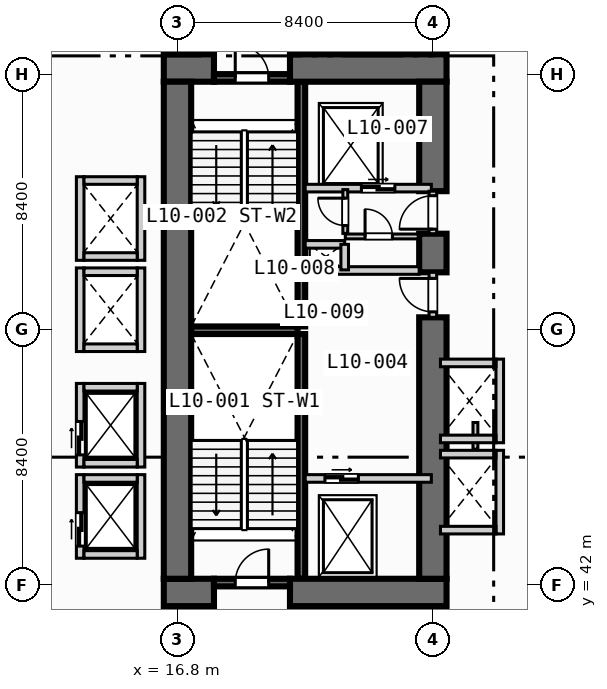
"""IFC4 building model, lengths in metres.
Left out: names, types, materials, properties, quantities, classifications, styles, units other than length and angle.
Written with IfcOpenShell. Run it as: python <this file> out.ifc"""

import sys

from ifc_helpers import new_model, si_unit, direction, frame, frame_2d, origin, place, context, subcontext, project, spatial, rectangle, extrude, element, fill, save


model = new_model("IFC4")
c1 = context("Model", 3, precision=1e-05, world=origin(), true_north=direction((0.0, 1.0)))
c2 = subcontext(c1, "Body", "Model", "MODEL_VIEW")
j1 = project(units=[si_unit("LENGTHUNIT", "METRE"), si_unit("PLANEANGLEUNIT", "RADIAN")], contexts=[c1])
p1 = place(None, origin())
s1 = spatial("IfcSite", under=j1, at=p1, CompositionType="ELEMENT")
p2 = place(p1, origin())
s2 = spatial("IfcBuilding", under=s1, at=p2, CompositionType="ELEMENT")
p3 = place(p2, frame((0.0, 0.0, 47.2)))
s3 = spatial("IfcBuildingStorey", under=s2, at=p3, CompositionType="ELEMENT", Elevation=47.2)
for number, where, z_axis, x_axis in (
    (1, (20.875, 42.2, 0.0), (0.0, 0.0, 1.0), (0.0, 1.0, 0.0)),
    (2, (20.875, 50.5, 0.0), (0.0, 0.0, 1.0), (0.0, 1.0, 0.0)),
):
    element("IfcWall", number, at=place(p3, frame(where, z_axis=z_axis, x_axis=x_axis)), inside=s3, PredefinedType="SOLIDWALL", context=c2, shape_type="SweptSolid", body=[
        extrude(rectangle(XDim=8.05, YDim=0.25, at=frame_2d((4.025, 0.0))), origin(), (0.0, 0.0, 1.0), 3.55),
    ])
p4 = place(p3, frame((17.25, 50.375, 0.0), z_axis=(0.0, 0.0, 1.0), x_axis=(1.0, 0.0, 0.0)))
e3 = element("IfcWall", 3, at=p4, inside=s3, PredefinedType="SOLIDWALL", context=c2, shape_type="SweptSolid", body=[
    extrude(rectangle(XDim=3.5, YDim=0.25, at=frame_2d((1.75, 0.0))), origin(), (0.0, 0.0, 1.0), 3.55),
])
p5 = place(p3, frame((16.35, 41.75, 0.0), z_axis=(0.0, 0.0, 1.0), x_axis=(1.0, 0.0, 0.0)))
e4 = element("IfcWall", 4, at=p5, inside=s3, PredefinedType="SHEAR", context=c2, shape_type="SweptSolid", body=[
    extrude(rectangle(XDim=1.65, YDim=0.9, at=frame_2d((0.825, 0.0))), origin(), (0.0, 0.0, 1.0), 3.55),
])
p6 = place(p3, frame((20.5, 41.75, 0.0), z_axis=(0.0, 0.0, 1.0), x_axis=(1.0, 0.0, 0.0)))
e5 = element("IfcWall", 5, at=p6, inside=s3, PredefinedType="SHEAR", context=c2, shape_type="SweptSolid", body=[
    extrude(rectangle(XDim=5.15, YDim=0.9, at=frame_2d((2.575, 0.0))), origin(), (0.0, 0.0, 1.0), 3.55),
])
p7 = place(p3, frame((16.35, 59.0, 0.0), z_axis=(0.0, 0.0, 1.0), x_axis=(1.0, 0.0, 0.0)))
e6 = element("IfcWall", 6, at=p7, inside=s3, PredefinedType="SHEAR", context=c2, shape_type="SweptSolid", body=[
    extrude(rectangle(XDim=1.65, YDim=0.9, at=frame_2d((0.825, 0.0))), origin(), (0.0, 0.0, 1.0), 3.55),
])
p8 = place(p3, frame((20.5, 59.0, 0.0), z_axis=(0.0, 0.0, 1.0), x_axis=(1.0, 0.0, 0.0)))
e7 = element("IfcWall", 7, at=p8, inside=s3, PredefinedType="SHEAR", context=c2, shape_type="SweptSolid", body=[
    extrude(rectangle(XDim=5.15, YDim=0.9, at=frame_2d((2.575, 0.0))), origin(), (0.0, 0.0, 1.0), 3.55),
])
p9 = place(p3, frame((16.8, 42.2, 0.0), z_axis=(0.0, 0.0, 1.0), x_axis=(0.0, 1.0, 0.0)))
e8 = element("IfcWall", 8, at=p9, inside=s3, PredefinedType="SHEAR", context=c2, shape_type="SweptSolid", body=[
    extrude(rectangle(XDim=16.35, YDim=0.9, at=frame_2d((8.175, 0.0))), origin(), (0.0, 0.0, 1.0), 3.55),
])
p10 = place(p3, frame((25.2, 42.2, 0.0), z_axis=(0.0, 0.0, 1.0), x_axis=(0.0, 1.0, 0.0)))
e9 = element("IfcWall", 9, at=p10, inside=s3, PredefinedType="SHEAR", context=c2, shape_type="SweptSolid", body=[
    extrude(rectangle(XDim=8.6, YDim=0.9, at=frame_2d((4.3, 0.0))), origin(), (0.0, 0.0, 1.0), 3.55),
])
p11 = place(p3, frame((25.2, 52.28, 0.0), z_axis=(0.0, 0.0, 1.0), x_axis=(0.0, 1.0, 0.0)))
e10 = element("IfcWall", 10, at=p11, inside=s3, PredefinedType="SHEAR", context=c2, shape_type="SweptSolid", body=[
    extrude(rectangle(XDim=1.27, YDim=0.9, at=frame_2d((0.635, 0.0))), origin(), (0.0, 0.0, 1.0), 3.55),
])
p12 = place(p3, frame((25.2, 54.95, 0.0), z_axis=(0.0, 0.0, 1.0), x_axis=(0.0, 1.0, 0.0)))
e11 = element("IfcWall", 11, at=p12, inside=s3, PredefinedType="SHEAR", context=c2, shape_type="SweptSolid", body=[
    extrude(rectangle(XDim=3.6, YDim=0.9, at=frame_2d((1.8, 0.0))), origin(), (0.0, 0.0, 1.0), 3.55),
])
p13 = place(p3, frame((18.0, 42.075, 0.0), z_axis=(0.0, 0.0, 1.0), x_axis=(1.0, 0.0, 0.0)))
e12 = element("IfcWall", 12, at=p13, inside=s3, PredefinedType="SOLIDWALL", context=c2, shape_type="SweptSolid", body=[
    extrude(rectangle(XDim=2.5, YDim=0.25, at=frame_2d((1.25, 0.0))), origin(), (0.0, 0.0, 1.0), 3.55),
])
p14 = place(p13, frame((0.7, 0.0, 0.0)))
e13 = element("IfcOpeningElement", 13, at=p14, cuts=e12, PredefinedType="OPENING", context=c2, shape_type="SweptSolid", body=[
    extrude(rectangle(XDim=1.1, YDim=2.15, at=frame_2d((0.55, 1.075))), frame((0.0, 0.135, 0.0), z_axis=(0.0, -1.0, 0.0), x_axis=(1.0, 0.0, 0.0)), (0.0, 0.0, 1.0), 0.27),
])
p15 = place(p3, frame((18.0, 58.675, 0.0), z_axis=(0.0, 0.0, 1.0), x_axis=(1.0, 0.0, 0.0)))
e14 = element("IfcWall", 14, at=p15, inside=s3, PredefinedType="SOLIDWALL", context=c2, shape_type="SweptSolid", body=[
    extrude(rectangle(XDim=2.5, YDim=0.25, at=frame_2d((1.25, 0.0))), origin(), (0.0, 0.0, 1.0), 3.55),
])
p16 = place(p15, frame((0.7, 0.0, 0.0)))
e15 = element("IfcOpeningElement", 15, at=p16, cuts=e14, PredefinedType="OPENING", context=c2, shape_type="SweptSolid", body=[
    extrude(rectangle(XDim=1.1, YDim=2.15, at=frame_2d((0.55, 1.075))), frame((0.0, 0.135, 0.0), z_axis=(0.0, -1.0, 0.0), x_axis=(1.0, 0.0, 0.0)), (0.0, 0.0, 1.0), 0.27),
])
p17 = place(p3, frame((21.0, 45.5, 0.0), z_axis=(0.0, 0.0, 1.0), x_axis=(1.0, 0.0, 0.0)))
e16 = element("IfcWall", 16, at=p17, inside=s3, PredefinedType="SOLIDWALL", context=c2, shape_type="SweptSolid", body=[
    extrude(rectangle(XDim=4.15, YDim=0.25, at=frame_2d((2.075, 0.0))), origin(), (0.0, 0.0, 1.0), 3.55),
])
p18 = place(p17, frame((0.65, 0.0, 0.0)))
e17 = element("IfcOpeningElement", 17, at=p18, cuts=e16, PredefinedType="OPENING", context=c2, shape_type="SweptSolid", body=[
    extrude(rectangle(XDim=1.1, YDim=2.15, at=frame_2d((0.55, 1.075))), frame((0.0, 0.135, 0.0), z_axis=(0.0, -1.0, 0.0), x_axis=(1.0, 0.0, 0.0)), (0.0, 0.0, 1.0), 0.27),
])
p19 = place(p3, frame((25.2, 50.8, 0.0), z_axis=(0.0, 0.0, 1.0), x_axis=(0.0, 1.0, 0.0)))
e18 = element("IfcWall", 18, at=p19, inside=s3, PredefinedType="SOLIDWALL", context=c2, shape_type="SweptSolid", body=[
    extrude(rectangle(XDim=1.48, YDim=0.25, at=frame_2d((0.74, 0.0))), origin(), (0.0, 0.0, 1.0), 3.55),
])
p20 = place(p19, frame((0.18, 0.0, 0.0)))
e19 = element("IfcOpeningElement", 19, at=p20, cuts=e18, PredefinedType="OPENING", context=c2, shape_type="SweptSolid", body=[
    extrude(rectangle(XDim=1.1, YDim=2.15, at=frame_2d((0.55, 1.075))), frame((0.0, 0.135, 0.0), z_axis=(0.0, -1.0, 0.0), x_axis=(1.0, 0.0, 0.0)), (0.0, 0.0, 1.0), 0.27),
])
p21 = place(p3, frame((21.0, 52.34, 0.0), z_axis=(0.0, 0.0, 1.0), x_axis=(1.0, 0.0, 0.0)))
e20 = element("IfcWall", 20, at=p21, inside=s3, PredefinedType="SOLIDWALL", context=c2, shape_type="SweptSolid", body=[
    extrude(rectangle(XDim=3.75, YDim=0.25, at=frame_2d((1.875, 0.0))), origin(), (0.0, 0.0, 1.0), 3.55),
])
p22 = place(p3, frame((21.0, 55.05, 0.0), z_axis=(0.0, 0.0, 1.0), x_axis=(1.0, 0.0, 0.0)))
e21 = element("IfcWall", 21, at=p22, inside=s3, PredefinedType="SOLIDWALL", context=c2, shape_type="SweptSolid", body=[
    extrude(rectangle(XDim=4.15, YDim=0.25, at=frame_2d((2.075, 0.0))), origin(), (0.0, 0.0, 1.0), 3.55),
])
p23 = place(p22, frame((1.85, 0.0, 0.0)))
e22 = element("IfcOpeningElement", 22, at=p23, cuts=e21, PredefinedType="OPENING", context=c2, shape_type="SweptSolid", body=[
    extrude(rectangle(XDim=1.1, YDim=2.15, at=frame_2d((0.55, 1.075))), frame((0.0, 0.135, 0.0), z_axis=(0.0, -1.0, 0.0), x_axis=(1.0, 0.0, 0.0)), (0.0, 0.0, 1.0), 0.27),
])
p24 = place(p3, frame((25.2, 53.55, 0.0), z_axis=(0.0, 0.0, 1.0), x_axis=(0.0, 1.0, 0.0)))
e23 = element("IfcWall", 23, at=p24, inside=s3, PredefinedType="SOLIDWALL", context=c2, shape_type="SweptSolid", body=[
    extrude(rectangle(XDim=1.4, YDim=0.25, at=frame_2d((0.7, 0.0))), origin(), (0.0, 0.0, 1.0), 3.55),
])
p25 = place(p24, frame((0.15, 0.0, 0.0)))
e24 = element("IfcOpeningElement", 24, at=p25, cuts=e23, PredefinedType="OPENING", context=c2, shape_type="SweptSolid", body=[
    extrude(rectangle(XDim=1.1, YDim=2.15, at=frame_2d((0.55, 1.075))), frame((0.0, 0.135, 0.0), z_axis=(0.0, -1.0, 0.0), x_axis=(1.0, 0.0, 0.0)), (0.0, 0.0, 1.0), 0.27),
])
p26 = place(p3, frame((21.0, 53.2, 0.0), z_axis=(0.0, 0.0, 1.0), x_axis=(1.0, 0.0, 0.0)))
e25 = element("IfcWall", 25, at=p26, inside=s3, PredefinedType="SOLIDWALL", context=c2, shape_type="SweptSolid", body=[
    extrude(rectangle(XDim=1.3, YDim=0.25, at=frame_2d((0.65, 0.0))), origin(), (0.0, 0.0, 1.0), 3.55),
])
p27 = place(p3, frame((22.3, 52.36, 0.0), z_axis=(0.0, 0.0, 1.0), x_axis=(0.0, 1.0, 0.0)))
e26 = element("IfcWall", 26, at=p27, inside=s3, PredefinedType="SOLIDWALL", context=c2, shape_type="SweptSolid", body=[
    extrude(rectangle(XDim=0.84, YDim=0.25, at=frame_2d((0.42, 0.0))), origin(), (0.0, 0.0, 1.0), 3.55),
])
p28 = place(p3, frame((22.32, 53.56, 0.0), z_axis=(0.0, 0.0, 1.0), x_axis=(0.0, 1.0, 0.0)))
e27 = element("IfcWall", 27, at=p28, inside=s3, PredefinedType="PARTITIONING", context=c2, shape_type="SweptSolid", body=[
    extrude(rectangle(XDim=1.44, YDim=0.16, at=frame_2d((0.72, 0.0))), origin(), (0.0, 0.0, 1.0), 3.55),
])
p29 = place(p28, frame((0.26, 0.0, 0.0)))
e28 = element("IfcOpeningElement", 28, at=p29, cuts=e27, PredefinedType="OPENING", context=c2, shape_type="SweptSolid", body=[
    extrude(rectangle(XDim=0.9, YDim=2.1, at=frame_2d((0.45, 1.05))), frame((0.0, 0.09, 0.0), z_axis=(0.0, -1.0, 0.0), x_axis=(1.0, 0.0, 0.0)), (0.0, 0.0, 1.0), 0.18),
])
p30 = place(p3, frame((22.32, 53.46, 0.0), z_axis=(0.0, 0.0, 1.0), x_axis=(1.0, 0.0, 0.0)))
e29 = element("IfcWall", 29, at=p30, inside=s3, PredefinedType="PARTITIONING", context=c2, shape_type="SweptSolid", body=[
    extrude(rectangle(XDim=2.4, YDim=0.16, at=frame_2d((1.2, 0.0))), origin(), (0.0, 0.0, 1.0), 3.55),
])
p31 = place(p30, frame((0.65, 0.0, 0.0)))
e30 = element("IfcOpeningElement", 30, at=p31, cuts=e29, PredefinedType="OPENING", context=c2, shape_type="SweptSolid", body=[
    extrude(rectangle(XDim=0.9, YDim=2.1, at=frame_2d((0.45, 1.05))), frame((0.0, 0.09, 0.0), z_axis=(0.0, -1.0, 0.0), x_axis=(1.0, 0.0, 0.0)), (0.0, 0.0, 1.0), 0.18),
])
p32 = place(p3, frame((13.6, 42.875, 0.0), z_axis=(0.0, 0.0, 1.0), x_axis=(0.0, 1.0, 0.0)))
e31 = element("IfcWall", 31, at=p32, inside=s3, PredefinedType="SOLIDWALL", context=c2, shape_type="SweptSolid", body=[
    extrude(rectangle(XDim=2.75, YDim=0.25, at=frame_2d((1.375, 0.0))), origin(), (0.0, 0.0, 1.0), 3.55),
])
p33 = place(p32, frame((0.4, 0.0, 0.0)))
e32 = element("IfcOpeningElement", 32, at=p33, cuts=e31, PredefinedType="OPENING", context=c2, shape_type="SweptSolid", body=[
    extrude(rectangle(XDim=1.1, YDim=2.15, at=frame_2d((0.55, 1.075))), frame((0.0, 0.135, 0.0), z_axis=(0.0, -1.0, 0.0), x_axis=(1.0, 0.0, 0.0)), (0.0, 0.0, 1.0), 0.27),
])
p34 = place(p3, frame((15.6, 42.875, 0.0), z_axis=(0.0, 0.0, 1.0), x_axis=(0.0, 1.0, 0.0)))
e33 = element("IfcWall", 33, at=p34, inside=s3, PredefinedType="SOLIDWALL", context=c2, shape_type="SweptSolid", body=[
    extrude(rectangle(XDim=2.75, YDim=0.25, at=frame_2d((1.375, 0.0))), origin(), (0.0, 0.0, 1.0), 3.55),
])
for number, where, z_axis, x_axis in (
    (34, (13.725, 43.0, 0.0), (0.0, 0.0, 1.0), (1.0, 0.0, 0.0)),
    (35, (13.725, 45.5, 0.0), (0.0, 0.0, 1.0), (1.0, 0.0, 0.0)),
):
    element("IfcWall", number, at=place(p3, frame(where, z_axis=z_axis, x_axis=x_axis)), inside=s3, PredefinedType="SOLIDWALL", context=c2, shape_type="SweptSolid", body=[
        extrude(rectangle(XDim=1.75, YDim=0.25, at=frame_2d((0.875, 0.0))), origin(), (0.0, 0.0, 1.0), 3.55),
    ])
p35 = place(p3, frame((13.6, 45.875, 0.0), z_axis=(0.0, 0.0, 1.0), x_axis=(0.0, 1.0, 0.0)))
e36 = element("IfcWall", 36, at=p35, inside=s3, PredefinedType="SOLIDWALL", context=c2, shape_type="SweptSolid", body=[
    extrude(rectangle(XDim=2.75, YDim=0.25, at=frame_2d((1.375, 0.0))), origin(), (0.0, 0.0, 1.0), 3.55),
])
p36 = place(p35, frame((0.4, 0.0, 0.0)))
e37 = element("IfcOpeningElement", 37, at=p36, cuts=e36, PredefinedType="OPENING", context=c2, shape_type="SweptSolid", body=[
    extrude(rectangle(XDim=1.1, YDim=2.15, at=frame_2d((0.55, 1.075))), frame((0.0, 0.135, 0.0), z_axis=(0.0, -1.0, 0.0), x_axis=(1.0, 0.0, 0.0)), (0.0, 0.0, 1.0), 0.27),
])
p37 = place(p3, frame((15.6, 45.875, 0.0), z_axis=(0.0, 0.0, 1.0), x_axis=(0.0, 1.0, 0.0)))
e38 = element("IfcWall", 38, at=p37, inside=s3, PredefinedType="SOLIDWALL", context=c2, shape_type="SweptSolid", body=[
    extrude(rectangle(XDim=2.75, YDim=0.25, at=frame_2d((1.375, 0.0))), origin(), (0.0, 0.0, 1.0), 3.55),
])
for number, where, z_axis, x_axis in (
    (39, (13.725, 46.0, 0.0), (0.0, 0.0, 1.0), (1.0, 0.0, 0.0)),
    (40, (13.725, 48.5, 0.0), (0.0, 0.0, 1.0), (1.0, 0.0, 0.0)),
):
    element("IfcWall", number, at=place(p3, frame(where, z_axis=z_axis, x_axis=x_axis)), inside=s3, PredefinedType="SOLIDWALL", context=c2, shape_type="SweptSolid", body=[
        extrude(rectangle(XDim=1.75, YDim=0.25, at=frame_2d((0.875, 0.0))), origin(), (0.0, 0.0, 1.0), 3.55),
    ])
for number, where, z_axis, x_axis in (
    (41, (13.6, 49.675, 0.0), (0.0, 0.0, 1.0), (0.0, 1.0, 0.0)),
    (42, (15.6, 49.675, 0.0), (0.0, 0.0, 1.0), (0.0, 1.0, 0.0)),
):
    element("IfcWall", number, at=place(p3, frame(where, z_axis=z_axis, x_axis=x_axis)), inside=s3, PredefinedType="SOLIDWALL", context=c2, shape_type="SweptSolid", body=[
        extrude(rectangle(XDim=2.75, YDim=0.25, at=frame_2d((1.375, 0.0))), origin(), (0.0, 0.0, 1.0), 3.55),
    ])
for number, where, z_axis, x_axis in (
    (43, (13.725, 49.8, 0.0), (0.0, 0.0, 1.0), (1.0, 0.0, 0.0)),
    (44, (13.725, 52.3, 0.0), (0.0, 0.0, 1.0), (1.0, 0.0, 0.0)),
):
    element("IfcWall", number, at=place(p3, frame(where, z_axis=z_axis, x_axis=x_axis)), inside=s3, PredefinedType="SOLIDWALL", context=c2, shape_type="SweptSolid", body=[
        extrude(rectangle(XDim=1.75, YDim=0.25, at=frame_2d((0.875, 0.0))), origin(), (0.0, 0.0, 1.0), 3.55),
    ])
for number, where, z_axis, x_axis in (
    (45, (13.6, 52.675, 0.0), (0.0, 0.0, 1.0), (0.0, 1.0, 0.0)),
    (46, (15.6, 52.675, 0.0), (0.0, 0.0, 1.0), (0.0, 1.0, 0.0)),
):
    element("IfcWall", number, at=place(p3, frame(where, z_axis=z_axis, x_axis=x_axis)), inside=s3, PredefinedType="SOLIDWALL", context=c2, shape_type="SweptSolid", body=[
        extrude(rectangle(XDim=2.75, YDim=0.25, at=frame_2d((1.375, 0.0))), origin(), (0.0, 0.0, 1.0), 3.55),
    ])
for number, where, z_axis, x_axis in (
    (47, (13.725, 52.8, 0.0), (0.0, 0.0, 1.0), (1.0, 0.0, 0.0)),
    (48, (13.725, 55.3, 0.0), (0.0, 0.0, 1.0), (1.0, 0.0, 0.0)),
):
    element("IfcWall", number, at=place(p3, frame(where, z_axis=z_axis, x_axis=x_axis)), inside=s3, PredefinedType="SOLIDWALL", context=c2, shape_type="SweptSolid", body=[
        extrude(rectangle(XDim=1.75, YDim=0.25, at=frame_2d((0.875, 0.0))), origin(), (0.0, 0.0, 1.0), 3.55),
    ])
p38 = place(p3, frame((27.4, 43.675, 0.0), z_axis=(0.0, 0.0, 1.0), x_axis=(0.0, 1.0, 0.0)))
e49 = element("IfcWall", 49, at=p38, inside=s3, PredefinedType="SOLIDWALL", context=c2, shape_type="SweptSolid", body=[
    extrude(rectangle(XDim=2.75, YDim=0.25, at=frame_2d((1.375, 0.0))), origin(), (0.0, 0.0, 1.0), 3.55),
])
for number, where, z_axis, x_axis in (
    (50, (25.45, 43.8, 0.0), (0.0, 0.0, 1.0), (1.0, 0.0, 0.0)),
    (51, (25.45, 46.3, 0.0), (0.0, 0.0, 1.0), (1.0, 0.0, 0.0)),
):
    element("IfcWall", number, at=place(p3, frame(where, z_axis=z_axis, x_axis=x_axis)), inside=s3, PredefinedType="SOLIDWALL", context=c2, shape_type="SweptSolid", body=[
        extrude(rectangle(XDim=1.825, YDim=0.25, at=frame_2d((0.913, 0.0))), origin(), (0.0, 0.0, 1.0), 3.55),
    ])
p39 = place(p3, frame((26.6, 46.46, 0.0), z_axis=(0.0, 0.0, 1.0), x_axis=(0.0, 1.0, 0.0)))
e52 = element("IfcWall", 52, at=p39, inside=s3, PredefinedType="PARTITIONING", context=c2, shape_type="SweptSolid", body=[
    extrude(rectangle(XDim=0.88, YDim=0.16, at=frame_2d((0.44, 0.0))), origin(), (0.0, 0.0, 1.0), 3.55),
])
p40 = place(p3, frame((27.4, 46.675, 0.0), z_axis=(0.0, 0.0, 1.0), x_axis=(0.0, 1.0, 0.0)))
e53 = element("IfcWall", 53, at=p40, inside=s3, PredefinedType="SOLIDWALL", context=c2, shape_type="SweptSolid", body=[
    extrude(rectangle(XDim=2.75, YDim=0.25, at=frame_2d((1.375, 0.0))), origin(), (0.0, 0.0, 1.0), 3.55),
])
for number, where, z_axis, x_axis in (
    (54, (25.45, 46.8, 0.0), (0.0, 0.0, 1.0), (1.0, 0.0, 0.0)),
    (55, (25.45, 49.3, 0.0), (0.0, 0.0, 1.0), (1.0, 0.0, 0.0)),
):
    element("IfcWall", number, at=place(p3, frame(where, z_axis=z_axis, x_axis=x_axis)), inside=s3, PredefinedType="SOLIDWALL", context=c2, shape_type="SweptSolid", body=[
        extrude(rectangle(XDim=1.825, YDim=0.25, at=frame_2d((0.913, 0.0))), origin(), (0.0, 0.0, 1.0), 3.55),
    ])
p41 = place(p14, origin())
e56 = element("IfcDoor", 56, at=p41, inside=s3, OperationType="SINGLE_SWING_RIGHT", PredefinedType="DOOR", context=c2, shape_type="SweptSolid", body=[
    extrude(rectangle(XDim=1.1, YDim=2.15, at=frame_2d((0.55, 1.075))), frame((0.0, 0.025, 0.0), z_axis=(0.0, -1.0, 0.0), x_axis=(1.0, 0.0, 0.0)), (0.0, 0.0, 1.0), 0.05),
])
fill(e13, e56)
p42 = place(p16, origin())
e57 = element("IfcDoor", 57, at=p42, inside=s3, OperationType="SINGLE_SWING_LEFT", PredefinedType="DOOR", context=c2, shape_type="SweptSolid", body=[
    extrude(rectangle(XDim=1.1, YDim=2.15, at=frame_2d((0.55, 1.075))), frame((0.0, 0.025, 0.0), z_axis=(0.0, -1.0, 0.0), x_axis=(1.0, 0.0, 0.0)), (0.0, 0.0, 1.0), 0.05),
])
fill(e15, e57)
p43 = place(p18, origin())
e58 = element("IfcDoor", 58, at=p43, inside=s3, OperationType="SLIDING_TO_LEFT", PredefinedType="DOOR", context=c2, shape_type="SweptSolid", body=[
    extrude(rectangle(XDim=1.1, YDim=2.15, at=frame_2d((0.55, 1.075))), frame((0.0, 0.025, 0.0), z_axis=(0.0, -1.0, 0.0), x_axis=(1.0, 0.0, 0.0)), (0.0, 0.0, 1.0), 0.05),
])
fill(e17, e58)
p44 = place(p20, origin())
e59 = element("IfcDoor", 59, at=p44, inside=s3, OperationType="SINGLE_SWING_RIGHT", PredefinedType="DOOR", context=c2, shape_type="SweptSolid", body=[
    extrude(rectangle(XDim=1.1, YDim=2.15, at=frame_2d((0.55, 1.075))), frame((0.0, 0.025, 0.0), z_axis=(0.0, -1.0, 0.0), x_axis=(1.0, 0.0, 0.0)), (0.0, 0.0, 1.0), 0.05),
])
fill(e19, e59)
p45 = place(p23, origin())
e60 = element("IfcDoor", 60, at=p45, inside=s3, OperationType="SLIDING_TO_LEFT", PredefinedType="DOOR", context=c2, shape_type="SweptSolid", body=[
    extrude(rectangle(XDim=1.1, YDim=2.15, at=frame_2d((0.55, 1.075))), frame((0.0, 0.025, 0.0), z_axis=(0.0, -1.0, 0.0), x_axis=(1.0, 0.0, 0.0)), (0.0, 0.0, 1.0), 0.05),
])
fill(e22, e60)
p46 = place(p25, origin())
e61 = element("IfcDoor", 61, at=p46, inside=s3, OperationType="SINGLE_SWING_LEFT", PredefinedType="DOOR", context=c2, shape_type="SweptSolid", body=[
    extrude(rectangle(XDim=1.1, YDim=2.15, at=frame_2d((0.55, 1.075))), frame((0.0, 0.025, 0.0), z_axis=(0.0, -1.0, 0.0), x_axis=(1.0, 0.0, 0.0)), (0.0, 0.0, 1.0), 0.05),
])
fill(e24, e61)
p47 = place(p29, origin())
e62 = element("IfcDoor", 62, at=p47, inside=s3, OperationType="SINGLE_SWING_RIGHT", PredefinedType="DOOR", context=c2, shape_type="SweptSolid", body=[
    extrude(rectangle(XDim=0.9, YDim=2.1, at=frame_2d((0.45, 1.05))), frame((0.0, 0.025, 0.0), z_axis=(0.0, -1.0, 0.0), x_axis=(1.0, 0.0, 0.0)), (0.0, 0.0, 1.0), 0.05),
])
fill(e28, e62)
p48 = place(p31, origin())
e63 = element("IfcDoor", 63, at=p48, inside=s3, OperationType="SINGLE_SWING_LEFT", PredefinedType="DOOR", context=c2, shape_type="SweptSolid", body=[
    extrude(rectangle(XDim=0.9, YDim=2.1, at=frame_2d((0.45, 1.05))), frame((0.0, 0.025, 0.0), z_axis=(0.0, -1.0, 0.0), x_axis=(1.0, 0.0, 0.0)), (0.0, 0.0, 1.0), 0.05),
])
fill(e30, e63)
p49 = place(p33, origin())
e64 = element("IfcDoor", 64, at=p49, inside=s3, OperationType="SLIDING_TO_LEFT", PredefinedType="DOOR", context=c2, shape_type="SweptSolid", body=[
    extrude(rectangle(XDim=1.1, YDim=2.15, at=frame_2d((0.55, 1.075))), frame((0.0, 0.025, 0.0), z_axis=(0.0, -1.0, 0.0), x_axis=(1.0, 0.0, 0.0)), (0.0, 0.0, 1.0), 0.05),
])
fill(e32, e64)
p50 = place(p36, origin())
e65 = element("IfcDoor", 65, at=p50, inside=s3, OperationType="SLIDING_TO_LEFT", PredefinedType="DOOR", context=c2, shape_type="SweptSolid", body=[
    extrude(rectangle(XDim=1.1, YDim=2.15, at=frame_2d((0.55, 1.075))), frame((0.0, 0.025, 0.0), z_axis=(0.0, -1.0, 0.0), x_axis=(1.0, 0.0, 0.0)), (0.0, 0.0, 1.0), 0.05),
])
fill(e37, e65)
save(model, sys.argv[1])
